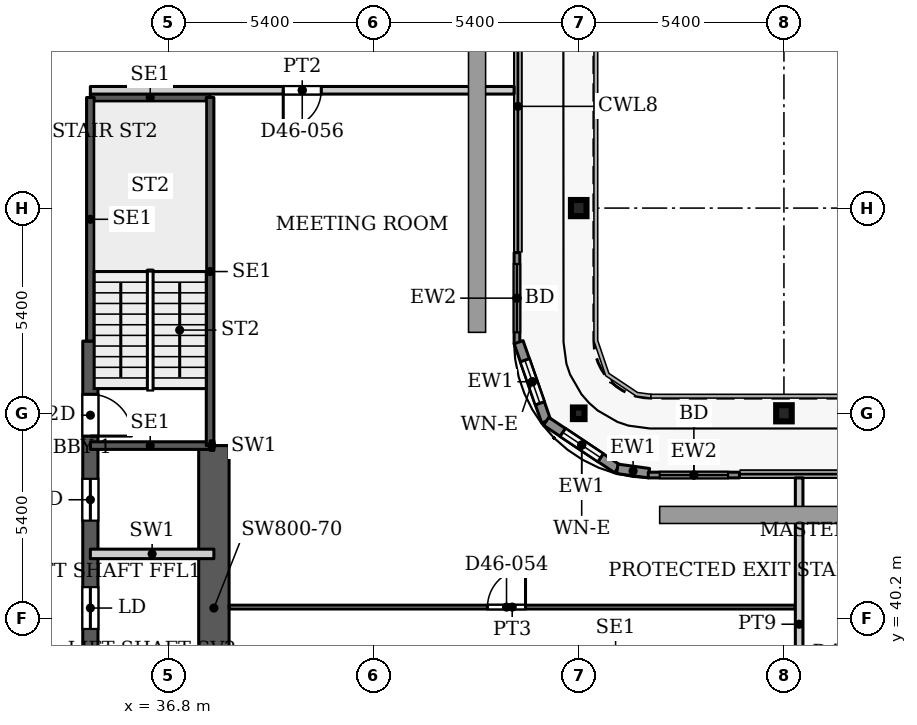
"""IFC4 building model, lengths in metres.
Left out: names, types, materials, properties, quantities, classifications, styles, units other than length and angle.
Written with IfcOpenShell. Run it as: python <this file> out.ifc"""

import sys

from ifc_helpers import new_model, si_unit, direction, frame, frame_2d, origin, origin_2d, place, context, subcontext, project, spatial, rectangle, hollow_rectangle, i_section, extrude, source, transform, mapped, element, fill, save


model = new_model("IFC4")
c1 = context("Model", 3, precision=1e-05, world=origin(), true_north=direction((0.0, 1.0)))
c2 = subcontext(c1, "Body", "Model", "MODEL_VIEW")
j1 = project(units=[si_unit("LENGTHUNIT", "METRE"), si_unit("PLANEANGLEUNIT", "RADIAN")], contexts=[c1])
p1 = place(None, origin())
s1 = spatial("IfcSite", under=j1, at=p1, CompositionType="ELEMENT")
p2 = place(p1, origin())
s2 = spatial("IfcBuilding", under=s1, at=p2, CompositionType="ELEMENT")
p3 = place(p2, frame((0.0, 0.0, 195.5)))
s3 = spatial("IfcBuildingStorey", under=s2, at=p3, CompositionType="ELEMENT", Elevation=195.5)
for number, where, z_axis, x_axis in (
    (1, (53.0, 45.6, 0.0), (0.0, 0.0, 1.0), (1.0, 0.0, 0.0)),
    (2, (47.6, 51.0, 0.0), (0.0, 0.0, 1.0), (1.0, 0.0, 0.0)),
):
    element("IfcColumn", number, at=place(p3, frame(where, z_axis=z_axis, x_axis=x_axis)), inside=s3, PredefinedType="COLUMN", context=c2, shape_type="SweptSolid", body=[
        extrude(i_section(OverallWidth=0.409, OverallDepth=0.425, WebThickness=0.033, FlangeThickness=0.052, FilletRadius=0.013, at=origin_2d()), origin(), (0.0, 0.0, 1.0), 3.9),
    ])
p4 = place(p3, frame((47.6, 45.6, 0.0), z_axis=(0.0, 0.0, 1.0), x_axis=(1.0, 0.0, 0.0)))
e3 = element("IfcColumn", 3, at=p4, inside=s3, PredefinedType="COLUMN", context=c2, shape_type="SweptSolid", body=[
    extrude(hollow_rectangle(XDim=0.305, YDim=0.305, WallThickness=0.016, InnerFilletRadius=0.016, OuterFilletRadius=0.032, at=origin_2d()), origin(), (0.0, 0.0, 1.0), 3.9),
])
p5 = place(p3, frame((34.75, 29.05, 0.0), z_axis=(0.0, 0.0, 1.0), x_axis=(0.0, 1.0, 0.0)))
e4 = element("IfcWall", 4, at=p5, inside=s3, PredefinedType="SHEAR", context=c2, shape_type="SweptSolid", body=[
    extrude(rectangle(XDim=18.45, YDim=0.4, at=frame_2d((9.225, 0.0))), origin(), (0.0, 0.0, 1.0), 3.9),
])
p6 = place(p5, frame((8.025, 0.0, 0.0)))
e5 = element("IfcOpeningElement", 5, at=p6, cuts=e4, PredefinedType="OPENING", context=c2, shape_type="SweptSolid", body=[
    extrude(rectangle(XDim=1.1, YDim=2.2, at=frame_2d((0.55, 1.1))), frame((0.0, 0.21, 0.0), z_axis=(0.0, -1.0, 0.0), x_axis=(1.0, 0.0, 0.0)), (0.0, 0.0, 1.0), 0.42),
])
p7 = place(p5, frame((10.875, 0.0, 0.0)))
e6 = element("IfcOpeningElement", 6, at=p7, cuts=e4, PredefinedType="OPENING", context=c2, shape_type="SweptSolid", body=[
    extrude(rectangle(XDim=1.1, YDim=2.2, at=frame_2d((0.55, 1.1))), frame((0.0, 0.21, 0.0), z_axis=(0.0, -1.0, 0.0), x_axis=(1.0, 0.0, 0.0)), (0.0, 0.0, 1.0), 0.42),
])
p8 = place(p5, frame((13.725, 0.0, 0.0)))
e7 = element("IfcOpeningElement", 7, at=p8, cuts=e4, PredefinedType="OPENING", context=c2, shape_type="SweptSolid", body=[
    extrude(rectangle(XDim=1.1, YDim=2.2, at=frame_2d((0.55, 1.1))), frame((0.0, 0.21, 0.0), z_axis=(0.0, -1.0, 0.0), x_axis=(1.0, 0.0, 0.0)), (0.0, 0.0, 1.0), 0.42),
])
p9 = place(p5, frame((15.95, 0.0, 0.0)))
e8 = element("IfcOpeningElement", 8, at=p9, cuts=e4, PredefinedType="OPENING", context=c2, shape_type="SweptSolid", body=[
    extrude(rectangle(XDim=1.1, YDim=2.2, at=frame_2d((0.55, 1.1))), frame((0.0, 0.21, 0.0), z_axis=(0.0, -1.0, 0.0), x_axis=(1.0, 0.0, 0.0)), (0.0, 0.0, 1.0), 0.42),
])
p10 = place(p3, frame((38.0, 36.2, 0.0), z_axis=(0.0, 0.0, 1.0), x_axis=(0.0, 1.0, 0.0)))
e9 = element("IfcWall", 9, at=p10, inside=s3, PredefinedType="SHEAR", context=c2, shape_type="SweptSolid", body=[
    extrude(rectangle(XDim=8.55, YDim=0.8, at=frame_2d((4.275, 0.0))), origin(), (0.0, 0.0, 1.0), 3.9),
])
p11 = place(p3, frame((45.975, 49.83, 0.0), z_axis=(0.0, 0.0, 1.0), x_axis=(0.0, -1.0, 0.0)))
e10 = element("IfcWall", 10, at=p11, inside=s3, PredefinedType="SOLIDWALL", context=c2, shape_type="SweptSolid", body=[
    extrude(rectangle(XDim=2.4, YDim=0.15, at=frame_2d((1.2, 0.0))), origin(), (0.0, 0.0, 1.0), 3.75),
])
p12 = place(p11, frame((0.3, 0.0, 0.0)))
e11 = element("IfcOpeningElement", 11, at=p12, cuts=e10, PredefinedType="OPENING", context=c2, shape_type="SweptSolid", body=[
    extrude(rectangle(XDim=1.8, YDim=2.4, at=frame_2d((0.9, 1.2))), frame((0.0, 0.085, 0.0), z_axis=(0.0, -1.0, 0.0), x_axis=(1.0, 0.0, 0.0)), (0.0, 0.0, 1.0), 0.17),
])
p13 = place(p3, frame((46.018, 47.471, 0.0), z_axis=(0.0, 0.0, 1.0), x_axis=(0.328791208903, -0.944402637093, 0.0)))
e12 = element("IfcWall", 12, at=p13, inside=s3, PredefinedType="SOLIDWALL", context=c2, shape_type="SweptSolid", body=[
    extrude(rectangle(XDim=2.205, YDim=0.25, at=frame_2d((1.102, 0.0))), origin(), (0.0, 0.0, 1.0), 3.75),
])
p14 = place(p13, frame((0.503, 0.0, 0.6)))
e13 = element("IfcOpeningElement", 13, at=p14, cuts=e12, PredefinedType="OPENING", context=c2, shape_type="SweptSolid", body=[
    extrude(rectangle(XDim=1.2, YDim=2.1, at=frame_2d((0.6, 1.05))), frame((0.0, 0.135, 0.0), z_axis=(0.0, -1.0, 0.0), x_axis=(1.0, 0.0, 0.0)), (0.0, 0.0, 1.0), 0.27),
])
p15 = place(p3, frame((46.743, 45.389, 0.0), z_axis=(0.0, 0.0, 1.0), x_axis=(0.831449265529, -0.555600682912, 0.0)))
e14 = element("IfcWall", 14, at=p15, inside=s3, PredefinedType="SOLIDWALL", context=c2, shape_type="SweptSolid", body=[
    extrude(rectangle(XDim=2.251, YDim=0.25, at=frame_2d((1.126, 0.0))), origin(), (0.0, 0.0, 1.0), 3.75),
])
p16 = place(p15, frame((0.525, 0.0, 0.6)))
e15 = element("IfcOpeningElement", 15, at=p16, cuts=e14, PredefinedType="OPENING", context=c2, shape_type="SweptSolid", body=[
    extrude(rectangle(XDim=1.2, YDim=2.1, at=frame_2d((0.6, 1.05))), frame((0.0, 0.135, 0.0), z_axis=(0.0, -1.0, 0.0), x_axis=(1.0, 0.0, 0.0)), (0.0, 0.0, 1.0), 0.27),
])
p17 = place(p3, frame((48.615, 44.138, 0.0), z_axis=(0.0, 0.0, 1.0), x_axis=(0.990741504246, -0.135761819977, 0.0)))
e16 = element("IfcWall", 16, at=p17, inside=s3, PredefinedType="SOLIDWALL", context=c2, shape_type="SweptSolid", body=[
    extrude(rectangle(XDim=0.84, YDim=0.25, at=frame_2d((0.42, 0.0))), origin(), (0.0, 0.0, 1.0), 3.75),
])
p18 = place(p3, frame((49.43, 43.975, 0.0), z_axis=(0.0, 0.0, 1.0), x_axis=(1.0, 0.0, 0.0)))
e17 = element("IfcWall", 17, at=p18, inside=s3, PredefinedType="SOLIDWALL", context=c2, shape_type="SweptSolid", body=[
    extrude(rectangle(XDim=2.4, YDim=0.15, at=frame_2d((1.2, 0.0))), origin(), (0.0, 0.0, 1.0), 3.75),
])
p19 = place(p18, frame((0.3, 0.0, 0.0)))
e18 = element("IfcOpeningElement", 18, at=p19, cuts=e17, PredefinedType="OPENING", context=c2, shape_type="SweptSolid", body=[
    extrude(rectangle(XDim=1.8, YDim=2.4, at=frame_2d((0.9, 1.2))), frame((0.0, 0.085, 0.0), z_axis=(0.0, -1.0, 0.0), x_axis=(1.0, 0.0, 0.0)), (0.0, 0.0, 1.0), 0.17),
])
for number, where, z_axis, x_axis in (
    (19, (34.75, 44.75, 0.0), (0.0, 0.0, 1.0), (1.0, 0.0, 0.0)),
    (20, (34.75, 53.91, 0.0), (0.0, 0.0, 1.0), (1.0, 0.0, 0.0)),
):
    element("IfcWall", number, at=place(p3, frame(where, z_axis=z_axis, x_axis=x_axis)), inside=s3, PredefinedType="SHEAR", context=c2, shape_type="SweptSolid", body=[
        extrude(rectangle(XDim=3.15, YDim=0.2, at=frame_2d((1.575, 0.0))), origin(), (0.0, 0.0, 1.0), 3.9),
    ])
p20 = place(p3, frame((34.75, 47.5, 0.0), z_axis=(0.0, 0.0, 1.0), x_axis=(0.0, 1.0, 0.0)))
e21 = element("IfcWall", 21, at=p20, inside=s3, PredefinedType="SHEAR", context=c2, shape_type="SweptSolid", body=[
    extrude(rectangle(XDim=6.41, YDim=0.2, at=frame_2d((3.205, 0.0))), origin(), (0.0, 0.0, 1.0), 3.9),
])
p21 = place(p3, frame((37.9, 44.75, 0.0), z_axis=(0.0, 0.0, 1.0), x_axis=(0.0, 1.0, 0.0)))
e22 = element("IfcWall", 22, at=p21, inside=s3, PredefinedType="SHEAR", context=c2, shape_type="SweptSolid", body=[
    extrude(rectangle(XDim=9.16, YDim=0.2, at=frame_2d((4.58, 0.0))), origin(), (0.0, 0.0, 1.0), 3.9),
])
p22 = place(p3, frame((34.75, 41.9, 0.0), z_axis=(0.0, 0.0, 1.0), x_axis=(1.0, 0.0, 0.0)))
e23 = element("IfcWall", 23, at=p22, inside=s3, PredefinedType="PARTITIONING", context=c2, shape_type="SweptSolid", body=[
    extrude(rectangle(XDim=3.25, YDim=0.25, at=frame_2d((1.625, 0.0))), origin(), (0.0, 0.0, 1.0), 3.9),
])
p23 = place(p3, frame((37.9, 44.75, 0.0), z_axis=(0.0, 0.0, 1.0), x_axis=(1.0, 0.0, 0.0)))
e24 = element("IfcWall", 24, at=p23, inside=s3, PredefinedType="PARTITIONING", context=c2, shape_type="SweptSolid", body=[
    extrude(rectangle(XDim=0.1, YDim=0.25, at=frame_2d((0.05, 0.0))), origin(), (0.0, 0.0, 1.0), 3.9),
])
p24 = place(p3, frame((34.75, 54.1, 0.0), z_axis=(0.0, 0.0, 1.0), x_axis=(1.0, 0.0, 0.0)))
e25 = element("IfcWall", 25, at=p24, inside=s3, PredefinedType="PARTITIONING", context=c2, shape_type="SweptSolid", body=[
    extrude(rectangle(XDim=11.15, YDim=0.2, at=frame_2d((5.575, 0.0))), origin(), (0.0, 0.0, 1.0), 3.6),
])
p25 = place(p24, frame((5.075, 0.0, 0.0)))
e26 = element("IfcOpeningElement", 26, at=p25, cuts=e25, PredefinedType="OPENING", context=c2, shape_type="SweptSolid", body=[
    extrude(rectangle(XDim=1.0, YDim=2.1, at=frame_2d((0.5, 1.05))), frame((0.0, 0.11, 0.0), z_axis=(0.0, -1.0, 0.0), x_axis=(1.0, 0.0, 0.0)), (0.0, 0.0, 1.0), 0.22),
])
p26 = place(p3, frame((38.399, 40.5, 0.0), z_axis=(0.0, 0.0, 1.0), x_axis=(1.0, 0.0, 0.0)))
e27 = element("IfcWall", 27, at=p26, inside=s3, PredefinedType="PARTITIONING", context=c2, shape_type="SweptSolid", body=[
    extrude(rectangle(XDim=14.901, YDim=0.1, at=frame_2d((7.451, 0.0))), origin(), (0.0, 0.0, 1.0), 3.6),
])
p27 = place(p26, frame((6.801, 0.0, 0.0)))
e28 = element("IfcOpeningElement", 28, at=p27, cuts=e27, PredefinedType="OPENING", context=c2, shape_type="SweptSolid", body=[
    extrude(rectangle(XDim=1.0, YDim=2.1, at=frame_2d((0.5, 1.05))), frame((0.0, 0.06, 0.0), z_axis=(0.0, -1.0, 0.0), x_axis=(1.0, 0.0, 0.0)), (0.0, 0.0, 1.0), 0.12),
])
p28 = place(p3, frame((53.4, 36.199, 0.0), z_axis=(0.0, 0.0, 1.0), x_axis=(0.0, 1.0, 0.0)))
e29 = element("IfcWall", 29, at=p28, inside=s3, PredefinedType="PARTITIONING", context=c2, shape_type="SweptSolid", body=[
    extrude(rectangle(XDim=7.701, YDim=0.2, at=frame_2d((3.851, 0.0))), origin(), (0.0, 0.0, 1.0), 3.6),
])
m1 = source(origin(), c2, "Body", "SweptSolid", [
    extrude(rectangle(XDim=1.8, YDim=2.4, at=frame_2d((0.9, 1.2))), frame((0.0, 0.025, 0.0), z_axis=(0.0, -1.0, 0.0), x_axis=(1.0, 0.0, 0.0)), (0.0, 0.0, 1.0), 0.05),
])
p29 = place(p12, origin())
e30 = element("IfcDoor", 30, at=p29, inside=s3, OperationType="SLIDING_TO_LEFT", PredefinedType="DOOR", context=c2, shape_type="MappedRepresentation", body=[
    mapped(m1, transform((0.0, 0.0, 0.0), x_axis=(1.0, 0.0, 0.0), y_axis=(0.0, 1.0, 0.0), z_axis=(0.0, 0.0, 1.0), scale=1.0)),
])
fill(e11, e30)
m2 = source(origin(), c2, "Body", "SweptSolid", [
    extrude(rectangle(XDim=1.2, YDim=2.1, at=frame_2d((0.6, 1.05))), frame((0.0, 0.03, 0.0), z_axis=(0.0, -1.0, 0.0), x_axis=(1.0, 0.0, 0.0)), (0.0, 0.0, 1.0), 0.06),
])
p30 = place(p14, origin())
e31 = element("IfcWindow", 31, at=p30, inside=s3, PartitioningType="SINGLE_PANEL", PredefinedType="WINDOW", context=c2, shape_type="MappedRepresentation", body=[
    mapped(m2, transform((0.0, 0.0, 0.0), x_axis=(1.0, 0.0, 0.0), y_axis=(0.0, 1.0, 0.0), z_axis=(0.0, 0.0, 1.0), scale=1.0)),
])
fill(e13, e31)
p31 = place(p16, origin())
e32 = element("IfcWindow", 32, at=p31, inside=s3, PartitioningType="SINGLE_PANEL", PredefinedType="WINDOW", context=c2, shape_type="MappedRepresentation", body=[
    mapped(m2, transform((0.0, 0.0, 0.0), x_axis=(1.0, 0.0, 0.0), y_axis=(0.0, 1.0, 0.0), z_axis=(0.0, 0.0, 1.0), scale=1.0)),
])
fill(e15, e32)
p32 = place(p19, origin())
e33 = element("IfcDoor", 33, at=p32, inside=s3, OperationType="SLIDING_TO_LEFT", PredefinedType="DOOR", context=c2, shape_type="MappedRepresentation", body=[
    mapped(m1, transform((0.0, 0.0, 0.0), x_axis=(1.0, 0.0, 0.0), y_axis=(0.0, 1.0, 0.0), z_axis=(0.0, 0.0, 1.0), scale=1.0)),
])
fill(e18, e33)
m3 = source(origin(), c2, "Body", "SweptSolid", [
    extrude(rectangle(XDim=1.1, YDim=2.2, at=frame_2d((0.55, 1.1))), frame((0.0, 0.025, 0.0), z_axis=(0.0, -1.0, 0.0), x_axis=(1.0, 0.0, 0.0)), (0.0, 0.0, 1.0), 0.05),
])
p33 = place(p7, origin())
e34 = element("IfcDoor", 34, at=p33, inside=s3, OperationType="SLIDING_TO_LEFT", PredefinedType="DOOR", context=c2, shape_type="MappedRepresentation", body=[
    mapped(m3, transform((0.0, 0.0, 0.0), x_axis=(1.0, 0.0, 0.0), y_axis=(0.0, 1.0, 0.0), z_axis=(0.0, 0.0, 1.0), scale=1.0)),
])
fill(e6, e34)
p34 = place(p8, origin())
e35 = element("IfcDoor", 35, at=p34, inside=s3, OperationType="SLIDING_TO_LEFT", PredefinedType="DOOR", context=c2, shape_type="MappedRepresentation", body=[
    mapped(m3, transform((0.0, 0.0, 0.0), x_axis=(1.0, 0.0, 0.0), y_axis=(0.0, 1.0, 0.0), z_axis=(0.0, 0.0, 1.0), scale=1.0)),
])
fill(e7, e35)
m4 = source(origin(), c2, "Body", "SweptSolid", [
    extrude(rectangle(XDim=1.1, YDim=2.2, at=frame_2d((0.55, 1.1))), frame((0.0, 0.025, 0.0), z_axis=(0.0, -1.0, 0.0), x_axis=(1.0, 0.0, 0.0)), (0.0, 0.0, 1.0), 0.05),
])
p35 = place(p9, origin())
e36 = element("IfcDoor", 36, at=p35, inside=s3, OperationType="SINGLE_SWING_RIGHT", PredefinedType="DOOR", context=c2, shape_type="MappedRepresentation", body=[
    mapped(m4, transform((0.0, 0.0, 0.0), x_axis=(1.0, 0.0, 0.0), y_axis=(0.0, 1.0, 0.0), z_axis=(0.0, 0.0, 1.0), scale=1.0)),
])
fill(e8, e36)
m5 = source(origin(), c2, "Body", "SweptSolid", [
    extrude(rectangle(XDim=1.0, YDim=2.1, at=frame_2d((0.5, 1.05))), frame((0.0, 0.025, 0.0), z_axis=(0.0, -1.0, 0.0), x_axis=(1.0, 0.0, 0.0)), (0.0, 0.0, 1.0), 0.05),
])
p36 = place(p27, origin())
e37 = element("IfcDoor", 37, at=p36, inside=s3, OperationType="SINGLE_SWING_LEFT", PredefinedType="DOOR", context=c2, shape_type="MappedRepresentation", body=[
    mapped(m5, transform((0.0, 0.0, 0.0), x_axis=(1.0, 0.0, 0.0), y_axis=(0.0, 1.0, 0.0), z_axis=(0.0, 0.0, 1.0), scale=1.0)),
])
fill(e28, e37)
m6 = source(origin(), c2, "Body", "SweptSolid", [
    extrude(rectangle(XDim=1.0, YDim=2.1, at=frame_2d((0.5, 1.05))), frame((0.0, 0.025, 0.0), z_axis=(0.0, -1.0, 0.0), x_axis=(1.0, 0.0, 0.0)), (0.0, 0.0, 1.0), 0.05),
])
p37 = place(p25, origin())
e38 = element("IfcDoor", 38, at=p37, inside=s3, OperationType="SINGLE_SWING_RIGHT", PredefinedType="DOOR", context=c2, shape_type="MappedRepresentation", body=[
    mapped(m6, transform((0.0, 0.0, 0.0), x_axis=(1.0, 0.0, 0.0), y_axis=(0.0, 1.0, 0.0), z_axis=(0.0, 0.0, 1.0), scale=1.0)),
])
fill(e26, e38)
save(model, sys.argv[1])
